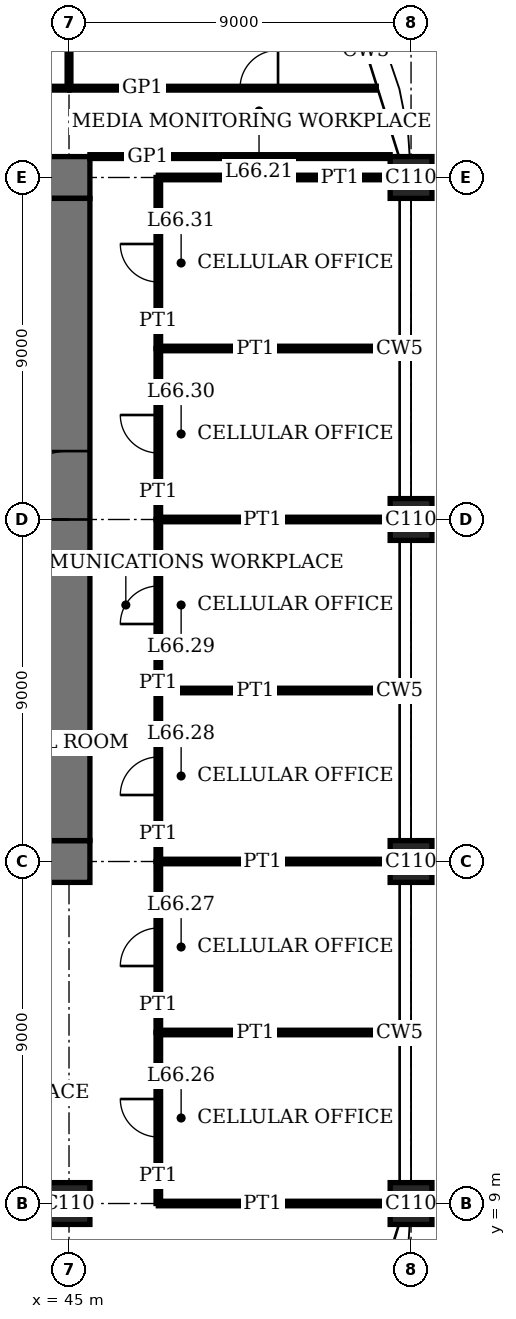
"""IFC4 building model, lengths in metres.
Left out: names, types, materials, properties, quantities, classifications, styles, units other than length and angle.
Written with IfcOpenShell. Run it as: python <this file> out.ifc"""

import sys

from ifc_helpers import new_model, si_unit, direction, frame, frame_2d, origin, origin_2d, place, context, subcontext, project, spatial, rectangle, extrude, element, fill, save


model = new_model("IFC4")
c1 = context("Model", 3, precision=1e-05, world=origin(), true_north=direction((0.0, 1.0)))
c2 = subcontext(c1, "Body", "Model", "MODEL_VIEW")
j1 = project(units=[si_unit("LENGTHUNIT", "METRE"), si_unit("PLANEANGLEUNIT", "RADIAN")], contexts=[c1])
p1 = place(None, origin())
s1 = spatial("IfcSite", under=j1, at=p1, CompositionType="ELEMENT")
p2 = place(p1, origin())
s2 = spatial("IfcBuilding", under=s1, at=p2, CompositionType="ELEMENT")
p3 = place(p2, frame((0.0, 0.0, 271.4)))
s3 = spatial("IfcBuildingStorey", under=s2, at=p3, CompositionType="ELEMENT", Elevation=271.4)
for number, where, z_axis, x_axis in (
    (1, (45.0, 9.0, 0.0), (0.0, 0.0, 1.0), (1.0, 0.0, 0.0)),
    (2, (54.0, 9.0, 0.0), (0.0, 0.0, 1.0), (1.0, 0.0, 0.0)),
    (3, (54.0, 18.0, 0.0), (0.0, 0.0, 1.0), (1.0, 0.0, 0.0)),
    (4, (54.0, 27.0, 0.0), (0.0, 0.0, 1.0), (1.0, 0.0, 0.0)),
    (5, (54.0, 36.0, 0.0), (0.0, 0.0, 1.0), (1.0, 0.0, 0.0)),
):
    element("IfcColumn", number, at=place(p3, frame(where, z_axis=z_axis, x_axis=x_axis)), inside=s3, PredefinedType="COLUMN", context=c2, shape_type="SweptSolid", body=[
        extrude(rectangle(XDim=1.1, YDim=1.1, at=origin_2d()), origin(), (0.0, 0.0, 1.0), 4.0),
    ])
p4 = place(p3, frame((17.45, 18.0, 0.0), z_axis=(0.0, 0.0, 1.0), x_axis=(1.0, 0.0, 0.0)))
e6 = element("IfcWall", 6, at=p4, inside=s3, PredefinedType="SHEAR", context=c2, shape_type="SweptSolid", body=[
    extrude(rectangle(XDim=28.1, YDim=1.1, at=frame_2d((14.05, 0.0))), origin(), (0.0, 0.0, 1.0), 4.0),
])
p5 = place(p4, frame((11.55, 0.0, 0.0)))
e7 = element("IfcOpeningElement", 7, at=p5, cuts=e6, PredefinedType="OPENING", context=c2, shape_type="SweptSolid", body=[
    extrude(rectangle(XDim=1.0, YDim=2.4, at=frame_2d((0.5, 1.2))), frame((0.0, 0.56, 0.0), z_axis=(0.0, -1.0, 0.0), x_axis=(1.0, 0.0, 0.0)), (0.0, 0.0, 1.0), 1.12),
])
p6 = place(p4, frame((16.55, 0.0, 0.0)))
e8 = element("IfcOpeningElement", 8, at=p6, cuts=e6, PredefinedType="OPENING", context=c2, shape_type="SweptSolid", body=[
    extrude(rectangle(XDim=1.0, YDim=2.4, at=frame_2d((0.5, 1.2))), frame((0.0, 0.56, 0.0), z_axis=(0.0, -1.0, 0.0), x_axis=(1.0, 0.0, 0.0)), (0.0, 0.0, 1.0), 1.12),
])
p7 = place(p4, frame((20.0, 0.0, 0.0)))
e9 = element("IfcOpeningElement", 9, at=p7, cuts=e6, PredefinedType="OPENING", context=c2, shape_type="SweptSolid", body=[
    extrude(rectangle(XDim=1.1, YDim=2.4, at=frame_2d((0.55, 1.2))), frame((0.0, 0.56, 0.0), z_axis=(0.0, -1.0, 0.0), x_axis=(1.0, 0.0, 0.0)), (0.0, 0.0, 1.0), 1.12),
])
p8 = place(p4, frame((24.05, 0.0, 0.0)))
e10 = element("IfcOpeningElement", 10, at=p8, cuts=e6, PredefinedType="OPENING", context=c2, shape_type="SweptSolid", body=[
    extrude(rectangle(XDim=1.0, YDim=2.4, at=frame_2d((0.5, 1.2))), frame((0.0, 0.56, 0.0), z_axis=(0.0, -1.0, 0.0), x_axis=(1.0, 0.0, 0.0)), (0.0, 0.0, 1.0), 1.12),
])
p9 = place(p3, frame((45.55, 36.0, 0.0), z_axis=(0.0, 0.0, 1.0), x_axis=(-1.0, 0.0, 0.0)))
e11 = element("IfcWall", 11, at=p9, inside=s3, PredefinedType="SHEAR", context=c2, shape_type="SweptSolid", body=[
    extrude(rectangle(XDim=28.1, YDim=1.1, at=frame_2d((14.05, 0.0))), origin(), (0.0, 0.0, 1.0), 4.0),
])
p10 = place(p9, frame((11.55, 0.0, 0.0)))
e12 = element("IfcOpeningElement", 12, at=p10, cuts=e11, PredefinedType="OPENING", context=c2, shape_type="SweptSolid", body=[
    extrude(rectangle(XDim=1.0, YDim=2.4, at=frame_2d((0.5, 1.2))), frame((0.0, 0.56, 0.0), z_axis=(0.0, -1.0, 0.0), x_axis=(1.0, 0.0, 0.0)), (0.0, 0.0, 1.0), 1.12),
])
p11 = place(p9, frame((16.55, 0.0, 0.0)))
e13 = element("IfcOpeningElement", 13, at=p11, cuts=e11, PredefinedType="OPENING", context=c2, shape_type="SweptSolid", body=[
    extrude(rectangle(XDim=1.0, YDim=2.4, at=frame_2d((0.5, 1.2))), frame((0.0, 0.56, 0.0), z_axis=(0.0, -1.0, 0.0), x_axis=(1.0, 0.0, 0.0)), (0.0, 0.0, 1.0), 1.12),
])
p12 = place(p9, frame((20.0, 0.0, 0.0)))
e14 = element("IfcOpeningElement", 14, at=p12, cuts=e11, PredefinedType="OPENING", context=c2, shape_type="SweptSolid", body=[
    extrude(rectangle(XDim=1.1, YDim=2.4, at=frame_2d((0.55, 1.2))), frame((0.0, 0.56, 0.0), z_axis=(0.0, -1.0, 0.0), x_axis=(1.0, 0.0, 0.0)), (0.0, 0.0, 1.0), 1.12),
])
p13 = place(p9, frame((24.05, 0.0, 0.0)))
e15 = element("IfcOpeningElement", 15, at=p13, cuts=e11, PredefinedType="OPENING", context=c2, shape_type="SweptSolid", body=[
    extrude(rectangle(XDim=1.0, YDim=2.4, at=frame_2d((0.5, 1.2))), frame((0.0, 0.56, 0.0), z_axis=(0.0, -1.0, 0.0), x_axis=(1.0, 0.0, 0.0)), (0.0, 0.0, 1.0), 1.12),
])
p14 = place(p3, frame((45.0, 18.55, 0.0), z_axis=(0.0, 0.0, 1.0), x_axis=(0.0, 1.0, 0.0)))
e16 = element("IfcWall", 16, at=p14, inside=s3, PredefinedType="SHEAR", context=c2, shape_type="SweptSolid", body=[
    extrude(rectangle(XDim=16.9, YDim=1.1, at=frame_2d((8.45, 0.0))), origin(), (0.0, 0.0, 1.0), 4.0),
])
p15 = place(p14, frame((8.45, 0.0, 0.0)))
e17 = element("IfcOpeningElement", 17, at=p15, cuts=e16, PredefinedType="OPENING", context=c2, shape_type="SweptSolid", body=[
    extrude(rectangle(XDim=1.8, YDim=2.4, at=frame_2d((0.9, 1.2))), frame((0.0, 0.56, 0.0), z_axis=(0.0, -1.0, 0.0), x_axis=(1.0, 0.0, 0.0)), (0.0, 0.0, 1.0), 1.12),
])
p16 = place(p3, frame((47.35, 9.0, 0.0), z_axis=(0.0, 0.0, 1.0), x_axis=(1.0, 0.0, 0.0)))
e18 = element("IfcWall", 18, at=p16, inside=s3, PredefinedType="PARTITIONING", context=c2, shape_type="SweptSolid", body=[
    extrude(rectangle(XDim=6.1, YDim=0.12, at=frame_2d((3.05, 0.0))), origin(), (0.0, 0.0, 1.0), 3.05),
])
p17 = place(p3, frame((47.35, 13.5, 0.0), z_axis=(0.0, 0.0, 1.0), x_axis=(1.0, 0.0, 0.0)))
e19 = element("IfcWall", 19, at=p17, inside=s3, PredefinedType="PARTITIONING", context=c2, shape_type="SweptSolid", body=[
    extrude(rectangle(XDim=6.34, YDim=0.12, at=frame_2d((3.17, 0.0))), origin(), (0.0, 0.0, 1.0), 3.1),
])
p18 = place(p3, frame((47.35, 18.0, 0.0), z_axis=(0.0, 0.0, 1.0), x_axis=(1.0, 0.0, 0.0)))
e20 = element("IfcWall", 20, at=p18, inside=s3, PredefinedType="PARTITIONING", context=c2, shape_type="SweptSolid", body=[
    extrude(rectangle(XDim=6.1, YDim=0.12, at=frame_2d((3.05, 0.0))), origin(), (0.0, 0.0, 1.0), 3.05),
])
p19 = place(p3, frame((47.35, 22.5, 0.0), z_axis=(0.0, 0.0, 1.0), x_axis=(1.0, 0.0, 0.0)))
e21 = element("IfcWall", 21, at=p19, inside=s3, PredefinedType="PARTITIONING", context=c2, shape_type="SweptSolid", body=[
    extrude(rectangle(XDim=6.34, YDim=0.12, at=frame_2d((3.17, 0.0))), origin(), (0.0, 0.0, 1.0), 3.1),
])
p20 = place(p3, frame((47.35, 27.0, 0.0), z_axis=(0.0, 0.0, 1.0), x_axis=(1.0, 0.0, 0.0)))
e22 = element("IfcWall", 22, at=p20, inside=s3, PredefinedType="PARTITIONING", context=c2, shape_type="SweptSolid", body=[
    extrude(rectangle(XDim=6.1, YDim=0.12, at=frame_2d((3.05, 0.0))), origin(), (0.0, 0.0, 1.0), 3.05),
])
p21 = place(p3, frame((47.35, 31.5, 0.0), z_axis=(0.0, 0.0, 1.0), x_axis=(1.0, 0.0, 0.0)))
e23 = element("IfcWall", 23, at=p21, inside=s3, PredefinedType="PARTITIONING", context=c2, shape_type="SweptSolid", body=[
    extrude(rectangle(XDim=6.34, YDim=0.12, at=frame_2d((3.17, 0.0))), origin(), (0.0, 0.0, 1.0), 3.1),
])
p22 = place(p3, frame((47.35, 36.0, 0.0), z_axis=(0.0, 0.0, 1.0), x_axis=(1.0, 0.0, 0.0)))
e24 = element("IfcWall", 24, at=p22, inside=s3, PredefinedType="PARTITIONING", context=c2, shape_type="SweptSolid", body=[
    extrude(rectangle(XDim=6.1, YDim=0.12, at=frame_2d((3.05, 0.0))), origin(), (0.0, 0.0, 1.0), 3.05),
])
p23 = place(p3, frame((45.55, 36.55, 0.0), z_axis=(0.0, 0.0, 1.0), x_axis=(1.0, 0.0, 0.0)))
e25 = element("IfcWall", 25, at=p23, inside=s3, PredefinedType="PARTITIONING", context=c2, shape_type="SweptSolid", body=[
    extrude(rectangle(XDim=7.9, YDim=0.1, at=frame_2d((3.95, 0.0))), origin(), (0.0, 0.0, 1.0), 3.75),
])
p24 = place(p3, frame((15.6, 38.35, 0.0), z_axis=(0.0, 0.0, 1.0), x_axis=(1.0, 0.0, 0.0)))
e26 = element("IfcWall", 26, at=p24, inside=s3, PredefinedType="PARTITIONING", context=c2, shape_type="SweptSolid", body=[
    extrude(rectangle(XDim=29.4, YDim=0.1, at=frame_2d((14.7, 0.0))), origin(), (0.0, 0.0, 1.0), 3.75),
])
p25 = place(p24, frame((14.2, 0.0, 0.0)))
e27 = element("IfcOpeningElement", 27, at=p25, cuts=e26, PredefinedType="OPENING", context=c2, shape_type="SweptSolid", body=[
    extrude(rectangle(XDim=1.0, YDim=2.4, at=frame_2d((0.5, 1.2))), frame((0.0, 0.06, 0.0), z_axis=(0.0, -1.0, 0.0), x_axis=(1.0, 0.0, 0.0)), (0.0, 0.0, 1.0), 0.12),
])
p26 = place(p3, frame((45.019, 38.35, 0.0), z_axis=(0.0, 0.0, 1.0), x_axis=(1.0, 0.0, 0.0)))
e28 = element("IfcWall", 28, at=p26, inside=s3, PredefinedType="PARTITIONING", context=c2, shape_type="SweptSolid", body=[
    extrude(rectangle(XDim=8.066, YDim=0.1, at=frame_2d((4.033, 0.0))), origin(), (0.0, 0.0, 1.0), 3.75),
])
p27 = place(p26, frame((4.481, 0.0, 0.0)))
e29 = element("IfcOpeningElement", 29, at=p27, cuts=e28, PredefinedType="OPENING", context=c2, shape_type="SweptSolid", body=[
    extrude(rectangle(XDim=1.0, YDim=2.4, at=frame_2d((0.5, 1.2))), frame((0.0, 0.06, 0.0), z_axis=(0.0, -1.0, 0.0), x_axis=(1.0, 0.0, 0.0)), (0.0, 0.0, 1.0), 0.12),
])
p28 = place(p3, frame((45.0, 38.35, 0.0), z_axis=(0.0, 0.0, 1.0), x_axis=(0.0, 1.0, 0.0)))
e30 = element("IfcWall", 30, at=p28, inside=s3, PredefinedType="PARTITIONING", context=c2, shape_type="SweptSolid", body=[
    extrude(rectangle(XDim=6.1, YDim=0.1, at=frame_2d((3.05, 0.0))), origin(), (0.0, 0.0, 1.0), 3.05),
])
p29 = place(p3, frame((47.35, 9.0, 0.0), z_axis=(0.0, 0.0, 1.0), x_axis=(0.0, 1.0, 0.0)))
e31 = element("IfcWall", 31, at=p29, inside=s3, PredefinedType="PARTITIONING", context=c2, shape_type="SweptSolid", body=[
    extrude(rectangle(XDim=4.5, YDim=0.12, at=frame_2d((2.25, 0.0))), origin(), (0.0, 0.0, 1.0), 3.75),
])
p30 = place(p29, frame((1.75, 0.0, 0.0)))
e32 = element("IfcOpeningElement", 32, at=p30, cuts=e31, PredefinedType="OPENING", context=c2, shape_type="SweptSolid", body=[
    extrude(rectangle(XDim=1.0, YDim=2.4, at=frame_2d((0.5, 1.2))), frame((0.0, 0.07, 0.0), z_axis=(0.0, -1.0, 0.0), x_axis=(1.0, 0.0, 0.0)), (0.0, 0.0, 1.0), 0.14),
])
p31 = place(p3, frame((47.35, 13.5, 0.0), z_axis=(0.0, 0.0, 1.0), x_axis=(0.0, 1.0, 0.0)))
e33 = element("IfcWall", 33, at=p31, inside=s3, PredefinedType="PARTITIONING", context=c2, shape_type="SweptSolid", body=[
    extrude(rectangle(XDim=4.5, YDim=0.12, at=frame_2d((2.25, 0.0))), origin(), (0.0, 0.0, 1.0), 3.75),
])
p32 = place(p31, frame((1.75, 0.0, 0.0)))
e34 = element("IfcOpeningElement", 34, at=p32, cuts=e33, PredefinedType="OPENING", context=c2, shape_type="SweptSolid", body=[
    extrude(rectangle(XDim=1.0, YDim=2.4, at=frame_2d((0.5, 1.2))), frame((0.0, 0.07, 0.0), z_axis=(0.0, -1.0, 0.0), x_axis=(1.0, 0.0, 0.0)), (0.0, 0.0, 1.0), 0.14),
])
p33 = place(p3, frame((47.35, 18.0, 0.0), z_axis=(0.0, 0.0, 1.0), x_axis=(0.0, 1.0, 0.0)))
e35 = element("IfcWall", 35, at=p33, inside=s3, PredefinedType="PARTITIONING", context=c2, shape_type="SweptSolid", body=[
    extrude(rectangle(XDim=4.5, YDim=0.12, at=frame_2d((2.25, 0.0))), origin(), (0.0, 0.0, 1.0), 3.75),
])
p34 = place(p33, frame((1.75, 0.0, 0.0)))
e36 = element("IfcOpeningElement", 36, at=p34, cuts=e35, PredefinedType="OPENING", context=c2, shape_type="SweptSolid", body=[
    extrude(rectangle(XDim=1.0, YDim=2.4, at=frame_2d((0.5, 1.2))), frame((0.0, 0.07, 0.0), z_axis=(0.0, -1.0, 0.0), x_axis=(1.0, 0.0, 0.0)), (0.0, 0.0, 1.0), 0.14),
])
p35 = place(p3, frame((47.35, 22.5, 0.0), z_axis=(0.0, 0.0, 1.0), x_axis=(0.0, 1.0, 0.0)))
e37 = element("IfcWall", 37, at=p35, inside=s3, PredefinedType="PARTITIONING", context=c2, shape_type="SweptSolid", body=[
    extrude(rectangle(XDim=4.5, YDim=0.12, at=frame_2d((2.25, 0.0))), origin(), (0.0, 0.0, 1.0), 3.75),
])
p36 = place(p35, frame((1.75, 0.0, 0.0)))
e38 = element("IfcOpeningElement", 38, at=p36, cuts=e37, PredefinedType="OPENING", context=c2, shape_type="SweptSolid", body=[
    extrude(rectangle(XDim=1.0, YDim=2.4, at=frame_2d((0.5, 1.2))), frame((0.0, 0.07, 0.0), z_axis=(0.0, -1.0, 0.0), x_axis=(1.0, 0.0, 0.0)), (0.0, 0.0, 1.0), 0.14),
])
p37 = place(p3, frame((47.35, 27.0, 0.0), z_axis=(0.0, 0.0, 1.0), x_axis=(0.0, 1.0, 0.0)))
e39 = element("IfcWall", 39, at=p37, inside=s3, PredefinedType="PARTITIONING", context=c2, shape_type="SweptSolid", body=[
    extrude(rectangle(XDim=4.5, YDim=0.12, at=frame_2d((2.25, 0.0))), origin(), (0.0, 0.0, 1.0), 3.75),
])
p38 = place(p37, frame((1.75, 0.0, 0.0)))
e40 = element("IfcOpeningElement", 40, at=p38, cuts=e39, PredefinedType="OPENING", context=c2, shape_type="SweptSolid", body=[
    extrude(rectangle(XDim=1.0, YDim=2.4, at=frame_2d((0.5, 1.2))), frame((0.0, 0.07, 0.0), z_axis=(0.0, -1.0, 0.0), x_axis=(1.0, 0.0, 0.0)), (0.0, 0.0, 1.0), 0.14),
])
p39 = place(p3, frame((47.35, 31.5, 0.0), z_axis=(0.0, 0.0, 1.0), x_axis=(0.0, 1.0, 0.0)))
e41 = element("IfcWall", 41, at=p39, inside=s3, PredefinedType="PARTITIONING", context=c2, shape_type="SweptSolid", body=[
    extrude(rectangle(XDim=4.5, YDim=0.12, at=frame_2d((2.25, 0.0))), origin(), (0.0, 0.0, 1.0), 3.75),
])
p40 = place(p39, frame((1.75, 0.0, 0.0)))
e42 = element("IfcOpeningElement", 42, at=p40, cuts=e41, PredefinedType="OPENING", context=c2, shape_type="SweptSolid", body=[
    extrude(rectangle(XDim=1.0, YDim=2.4, at=frame_2d((0.5, 1.2))), frame((0.0, 0.07, 0.0), z_axis=(0.0, -1.0, 0.0), x_axis=(1.0, 0.0, 0.0)), (0.0, 0.0, 1.0), 0.14),
])
p41 = place(p15, origin())
e43 = element("IfcDoor", 43, at=p41, inside=s3, OperationType="DOUBLE_DOOR_DOUBLE_SWING", PredefinedType="DOOR", context=c2, shape_type="SweptSolid", body=[
    extrude(rectangle(XDim=1.8, YDim=2.4, at=frame_2d((0.9, 1.2))), frame((0.0, 0.03, 0.0), z_axis=(0.0, -1.0, 0.0), x_axis=(1.0, 0.0, 0.0)), (0.0, 0.0, 1.0), 0.06),
    extrude(rectangle(XDim=0.04, YDim=2.4, at=frame_2d((0.02, 1.2))), frame((0.0, 0.55, 0.0), z_axis=(0.0, -1.0, 0.0), x_axis=(1.0, 0.0, 0.0)), (0.0, 0.0, 1.0), 1.1),
    extrude(rectangle(XDim=0.04, YDim=2.4, at=frame_2d((1.78, 1.2))), frame((0.0, 0.55, 0.0), z_axis=(0.0, -1.0, 0.0), x_axis=(1.0, 0.0, 0.0)), (0.0, 0.0, 1.0), 1.1),
    extrude(rectangle(XDim=1.8, YDim=0.04, at=frame_2d((0.9, 2.38))), frame((0.0, 0.55, 0.0), z_axis=(0.0, -1.0, 0.0), x_axis=(1.0, 0.0, 0.0)), (0.0, 0.0, 1.0), 1.1),
])
fill(e17, e43)
p42 = place(p27, origin())
e44 = element("IfcDoor", 44, at=p42, inside=s3, OperationType="SINGLE_SWING_LEFT", PredefinedType="DOOR", context=c2, shape_type="SweptSolid", body=[
    extrude(rectangle(XDim=1.0, YDim=2.4, at=frame_2d((0.5, 1.2))), frame((0.0, 0.02, 0.0), z_axis=(0.0, -1.0, 0.0), x_axis=(1.0, 0.0, 0.0)), (0.0, 0.0, 1.0), 0.04),
])
fill(e29, e44)
p43 = place(p30, origin())
e45 = element("IfcDoor", 45, at=p43, inside=s3, OperationType="SINGLE_SWING_LEFT", PredefinedType="DOOR", context=c2, shape_type="SweptSolid", body=[
    extrude(rectangle(XDim=1.0, YDim=2.4, at=frame_2d((0.5, 1.2))), frame((0.0, 0.025, 0.0), z_axis=(0.0, -1.0, 0.0), x_axis=(1.0, 0.0, 0.0)), (0.0, 0.0, 1.0), 0.05),
])
fill(e32, e45)
p44 = place(p32, origin())
e46 = element("IfcDoor", 46, at=p44, inside=s3, OperationType="SINGLE_SWING_RIGHT", PredefinedType="DOOR", context=c2, shape_type="SweptSolid", body=[
    extrude(rectangle(XDim=1.0, YDim=2.4, at=frame_2d((0.5, 1.2))), frame((0.0, 0.025, 0.0), z_axis=(0.0, -1.0, 0.0), x_axis=(1.0, 0.0, 0.0)), (0.0, 0.0, 1.0), 0.05),
])
fill(e34, e46)
p45 = place(p34, origin())
e47 = element("IfcDoor", 47, at=p45, inside=s3, OperationType="SINGLE_SWING_RIGHT", PredefinedType="DOOR", context=c2, shape_type="SweptSolid", body=[
    extrude(rectangle(XDim=1.0, YDim=2.4, at=frame_2d((0.5, 1.2))), frame((0.0, 0.025, 0.0), z_axis=(0.0, -1.0, 0.0), x_axis=(1.0, 0.0, 0.0)), (0.0, 0.0, 1.0), 0.05),
])
fill(e36, e47)
p46 = place(p36, origin())
e48 = element("IfcDoor", 48, at=p46, inside=s3, OperationType="SINGLE_SWING_RIGHT", PredefinedType="DOOR", context=c2, shape_type="SweptSolid", body=[
    extrude(rectangle(XDim=1.0, YDim=2.4, at=frame_2d((0.5, 1.2))), frame((0.0, 0.025, 0.0), z_axis=(0.0, -1.0, 0.0), x_axis=(1.0, 0.0, 0.0)), (0.0, 0.0, 1.0), 0.05),
])
fill(e38, e48)
p47 = place(p38, origin())
e49 = element("IfcDoor", 49, at=p47, inside=s3, OperationType="SINGLE_SWING_LEFT", PredefinedType="DOOR", context=c2, shape_type="SweptSolid", body=[
    extrude(rectangle(XDim=1.0, YDim=2.4, at=frame_2d((0.5, 1.2))), frame((0.0, 0.025, 0.0), z_axis=(0.0, -1.0, 0.0), x_axis=(1.0, 0.0, 0.0)), (0.0, 0.0, 1.0), 0.05),
])
fill(e40, e49)
p48 = place(p40, origin())
e50 = element("IfcDoor", 50, at=p48, inside=s3, OperationType="SINGLE_SWING_LEFT", PredefinedType="DOOR", context=c2, shape_type="SweptSolid", body=[
    extrude(rectangle(XDim=1.0, YDim=2.4, at=frame_2d((0.5, 1.2))), frame((0.0, 0.025, 0.0), z_axis=(0.0, -1.0, 0.0), x_axis=(1.0, 0.0, 0.0)), (0.0, 0.0, 1.0), 0.05),
])
fill(e42, e50)
save(model, sys.argv[1])
